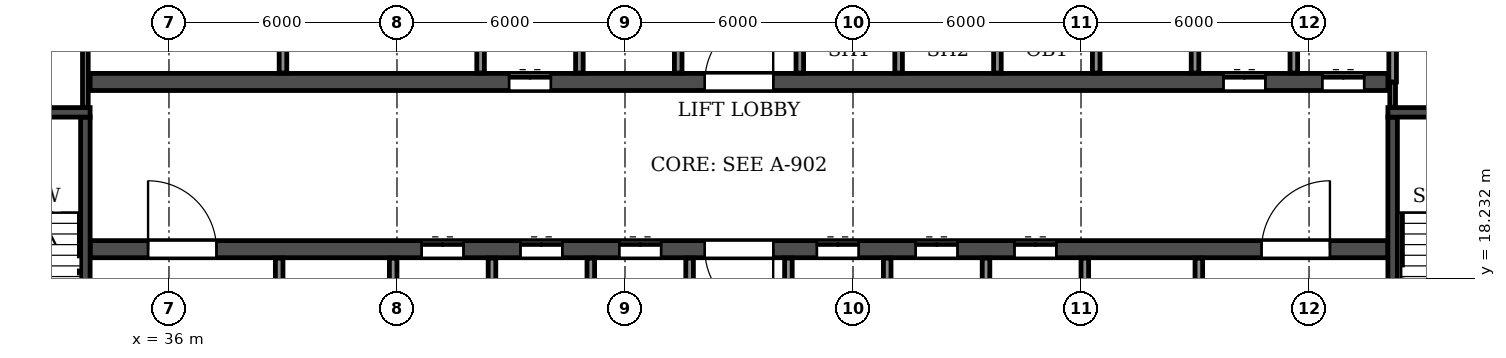
"""IFC4 building model, lengths in metres.
Left out: names, types, materials, properties, quantities, classifications, styles, units other than length and angle.
Written with IfcOpenShell. Run it as: python <this file> out.ifc"""

import sys

from ifc_helpers import new_model, si_unit, direction, frame, frame_2d, origin, place, context, subcontext, project, spatial, rectangle, extrude, element, fill, save


model = new_model("IFC4")
c1 = context("Model", 3, precision=1e-05, world=origin(), true_north=direction((0.0, 1.0)))
c2 = subcontext(c1, "Body", "Model", "MODEL_VIEW")
j1 = project(units=[si_unit("LENGTHUNIT", "METRE"), si_unit("PLANEANGLEUNIT", "RADIAN")], contexts=[c1])
p1 = place(None, origin())
s1 = spatial("IfcSite", under=j1, at=p1, CompositionType="ELEMENT")
p2 = place(p1, origin())
s2 = spatial("IfcBuilding", under=s1, at=p2, CompositionType="ELEMENT")
p3 = place(p2, frame((0.0, 0.0, 6.0)))
s3 = spatial("IfcBuildingStorey", under=s2, at=p3, CompositionType="ELEMENT", Elevation=6.0)
p4 = place(p3, frame((33.925, 19.0, 0.0), z_axis=(0.0, 0.0, 1.0), x_axis=(1.0, 0.0, 0.0)))
e1 = element("IfcWall", 1, at=p4, inside=s3, PredefinedType="SOLIDWALL", context=c2, shape_type="SweptSolid", body=[
    extrude(rectangle(XDim=34.15, YDim=0.45, at=frame_2d((17.075, 0.0))), origin(), (0.0, 0.0, 1.0), 4.52),
])
p5 = place(p4, frame((16.175, 0.0, 0.0)))
e2 = element("IfcOpeningElement", 2, at=p5, cuts=e1, PredefinedType="OPENING", context=c2, shape_type="SweptSolid", body=[
    extrude(rectangle(XDim=1.8, YDim=2.1, at=frame_2d((0.9, 1.05))), frame((0.0, 0.235, 0.0), z_axis=(0.0, -1.0, 0.0), x_axis=(1.0, 0.0, 0.0)), (0.0, 0.0, 1.0), 0.47),
])
p6 = place(p4, frame((1.525, 0.0, 0.0)))
e3 = element("IfcOpeningElement", 3, at=p6, cuts=e1, PredefinedType="OPENING", context=c2, shape_type="SweptSolid", body=[
    extrude(rectangle(XDim=1.8, YDim=2.1, at=frame_2d((0.9, 1.05))), frame((0.0, 0.235, 0.0), z_axis=(0.0, -1.0, 0.0), x_axis=(1.0, 0.0, 0.0)), (0.0, 0.0, 1.0), 0.47),
])
p7 = place(p4, frame((8.725, 0.0, 0.0)))
e4 = element("IfcOpeningElement", 4, at=p7, cuts=e1, PredefinedType="OPENING", context=c2, shape_type="SweptSolid", body=[
    extrude(rectangle(XDim=1.1, YDim=2.1, at=frame_2d((0.55, 1.05))), frame((0.0, 0.235, 0.0), z_axis=(0.0, -1.0, 0.0), x_axis=(1.0, 0.0, 0.0)), (0.0, 0.0, 1.0), 0.47),
])
p8 = place(p4, frame((11.325, 0.0, 0.0)))
e5 = element("IfcOpeningElement", 5, at=p8, cuts=e1, PredefinedType="OPENING", context=c2, shape_type="SweptSolid", body=[
    extrude(rectangle(XDim=1.1, YDim=2.1, at=frame_2d((0.55, 1.05))), frame((0.0, 0.235, 0.0), z_axis=(0.0, -1.0, 0.0), x_axis=(1.0, 0.0, 0.0)), (0.0, 0.0, 1.0), 0.47),
])
p9 = place(p4, frame((13.925, 0.0, 0.0)))
e6 = element("IfcOpeningElement", 6, at=p9, cuts=e1, PredefinedType="OPENING", context=c2, shape_type="SweptSolid", body=[
    extrude(rectangle(XDim=1.1, YDim=2.1, at=frame_2d((0.55, 1.05))), frame((0.0, 0.235, 0.0), z_axis=(0.0, -1.0, 0.0), x_axis=(1.0, 0.0, 0.0)), (0.0, 0.0, 1.0), 0.47),
])
p10 = place(p4, frame((19.125, 0.0, 0.0)))
e7 = element("IfcOpeningElement", 7, at=p10, cuts=e1, PredefinedType="OPENING", context=c2, shape_type="SweptSolid", body=[
    extrude(rectangle(XDim=1.1, YDim=2.1, at=frame_2d((0.55, 1.05))), frame((0.0, 0.235, 0.0), z_axis=(0.0, -1.0, 0.0), x_axis=(1.0, 0.0, 0.0)), (0.0, 0.0, 1.0), 0.47),
])
p11 = place(p4, frame((21.725, 0.0, 0.0)))
e8 = element("IfcOpeningElement", 8, at=p11, cuts=e1, PredefinedType="OPENING", context=c2, shape_type="SweptSolid", body=[
    extrude(rectangle(XDim=1.1, YDim=2.1, at=frame_2d((0.55, 1.05))), frame((0.0, 0.235, 0.0), z_axis=(0.0, -1.0, 0.0), x_axis=(1.0, 0.0, 0.0)), (0.0, 0.0, 1.0), 0.47),
])
p12 = place(p4, frame((24.325, 0.0, 0.0)))
e9 = element("IfcOpeningElement", 9, at=p12, cuts=e1, PredefinedType="OPENING", context=c2, shape_type="SweptSolid", body=[
    extrude(rectangle(XDim=1.1, YDim=2.1, at=frame_2d((0.55, 1.05))), frame((0.0, 0.235, 0.0), z_axis=(0.0, -1.0, 0.0), x_axis=(1.0, 0.0, 0.0)), (0.0, 0.0, 1.0), 0.47),
])
p13 = place(p4, frame((30.825, 0.0, 0.0)))
e10 = element("IfcOpeningElement", 10, at=p13, cuts=e1, PredefinedType="OPENING", context=c2, shape_type="SweptSolid", body=[
    extrude(rectangle(XDim=1.8, YDim=2.1, at=frame_2d((0.9, 1.05))), frame((0.0, 0.235, 0.0), z_axis=(0.0, -1.0, 0.0), x_axis=(1.0, 0.0, 0.0)), (0.0, 0.0, 1.0), 0.47),
])
p14 = place(p3, frame((33.925, 23.4, 0.0), z_axis=(0.0, 0.0, 1.0), x_axis=(1.0, 0.0, 0.0)))
e11 = element("IfcWall", 11, at=p14, inside=s3, PredefinedType="SOLIDWALL", context=c2, shape_type="SweptSolid", body=[
    extrude(rectangle(XDim=34.15, YDim=0.45, at=frame_2d((17.075, 0.0))), origin(), (0.0, 0.0, 1.0), 4.52),
])
p15 = place(p14, frame((16.175, 0.0, 0.0)))
e12 = element("IfcOpeningElement", 12, at=p15, cuts=e11, PredefinedType="OPENING", context=c2, shape_type="SweptSolid", body=[
    extrude(rectangle(XDim=1.8, YDim=2.1, at=frame_2d((0.9, 1.05))), frame((0.0, 0.235, 0.0), z_axis=(0.0, -1.0, 0.0), x_axis=(1.0, 0.0, 0.0)), (0.0, 0.0, 1.0), 0.47),
])
p16 = place(p14, frame((11.025, 0.0, 0.0)))
e13 = element("IfcOpeningElement", 13, at=p16, cuts=e11, PredefinedType="OPENING", context=c2, shape_type="SweptSolid", body=[
    extrude(rectangle(XDim=1.1, YDim=2.1, at=frame_2d((0.55, 1.05))), frame((0.0, 0.235, 0.0), z_axis=(0.0, -1.0, 0.0), x_axis=(1.0, 0.0, 0.0)), (0.0, 0.0, 1.0), 0.47),
])
p17 = place(p14, frame((29.825, 0.0, 0.0)))
e14 = element("IfcOpeningElement", 14, at=p17, cuts=e11, PredefinedType="OPENING", context=c2, shape_type="SweptSolid", body=[
    extrude(rectangle(XDim=1.1, YDim=2.1, at=frame_2d((0.55, 1.05))), frame((0.0, 0.235, 0.0), z_axis=(0.0, -1.0, 0.0), x_axis=(1.0, 0.0, 0.0)), (0.0, 0.0, 1.0), 0.47),
])
p18 = place(p14, frame((32.425, 0.0, 0.0)))
e15 = element("IfcOpeningElement", 15, at=p18, cuts=e11, PredefinedType="OPENING", context=c2, shape_type="SweptSolid", body=[
    extrude(rectangle(XDim=1.1, YDim=2.1, at=frame_2d((0.55, 1.05))), frame((0.0, 0.235, 0.0), z_axis=(0.0, -1.0, 0.0), x_axis=(1.0, 0.0, 0.0)), (0.0, 0.0, 1.0), 0.47),
])
p19 = place(p3, frame((33.8, 14.825, 0.0), z_axis=(0.0, 0.0, 1.0), x_axis=(0.0, 1.0, 0.0)))
e16 = element("IfcWall", 16, at=p19, inside=s3, PredefinedType="SOLIDWALL", context=c2, shape_type="SweptSolid", body=[
    extrude(rectangle(XDim=7.65, YDim=0.25, at=frame_2d((3.825, 0.0))), origin(), (0.0, 0.0, 1.0), 4.52),
])
p20 = place(p19, frame((0.475, 0.0, 0.0)))
e17 = element("IfcOpeningElement", 17, at=p20, cuts=e16, PredefinedType="OPENING", context=c2, shape_type="SweptSolid", body=[
    extrude(rectangle(XDim=1.0, YDim=2.1, at=frame_2d((0.5, 1.05))), frame((0.0, 0.135, 0.0), z_axis=(0.0, -1.0, 0.0), x_axis=(1.0, 0.0, 0.0)), (0.0, 0.0, 1.0), 0.27),
])
p21 = place(p3, frame((29.875, 22.6, 0.0), z_axis=(0.0, 0.0, 1.0), x_axis=(1.0, 0.0, 0.0)))
e18 = element("IfcWall", 18, at=p21, inside=s3, PredefinedType="SOLIDWALL", context=c2, shape_type="SweptSolid", body=[
    extrude(rectangle(XDim=4.05, YDim=0.25, at=frame_2d((2.025, 0.0))), origin(), (0.0, 0.0, 1.0), 4.52),
])
p22 = place(p3, frame((68.2, 14.825, 0.0), z_axis=(0.0, 0.0, 1.0), x_axis=(0.0, 1.0, 0.0)))
e19 = element("IfcWall", 19, at=p22, inside=s3, PredefinedType="SOLIDWALL", context=c2, shape_type="SweptSolid", body=[
    extrude(rectangle(XDim=7.65, YDim=0.25, at=frame_2d((3.825, 0.0))), origin(), (0.0, 0.0, 1.0), 4.52),
])
p23 = place(p22, frame((0.475, 0.0, 0.0)))
e20 = element("IfcOpeningElement", 20, at=p23, cuts=e19, PredefinedType="OPENING", context=c2, shape_type="SweptSolid", body=[
    extrude(rectangle(XDim=1.0, YDim=2.1, at=frame_2d((0.5, 1.05))), frame((0.0, 0.135, 0.0), z_axis=(0.0, -1.0, 0.0), x_axis=(1.0, 0.0, 0.0)), (0.0, 0.0, 1.0), 0.27),
])
p24 = place(p3, frame((68.075, 22.6, 0.0), z_axis=(0.0, 0.0, 1.0), x_axis=(1.0, 0.0, 0.0)))
e21 = element("IfcWall", 21, at=p24, inside=s3, PredefinedType="SOLIDWALL", context=c2, shape_type="SweptSolid", body=[
    extrude(rectangle(XDim=4.05, YDim=0.25, at=frame_2d((2.025, 0.0))), origin(), (0.0, 0.0, 1.0), 4.52),
])
for number, where, z_axis, x_axis in (
    (22, (49.4, 23.635, 0.0), (0.0, 0.0, 1.0), (0.0, 1.0, 0.0)),
    (23, (39.0, 23.635, 0.0), (0.0, 0.0, 1.0), (0.0, 1.0, 0.0)),
):
    element("IfcWall", number, at=place(p3, frame(where, z_axis=z_axis, x_axis=x_axis)), inside=s3, PredefinedType="PARTITIONING", context=c2, shape_type="SweptSolid", body=[
        extrude(rectangle(XDim=3.93, YDim=0.2, at=frame_2d((1.965, 0.0))), origin(), (0.0, 0.0, 1.0), 4.52),
    ])
p25 = place(p3, frame((33.8, 22.735, 0.0), z_axis=(0.0, 0.0, 1.0), x_axis=(0.0, 1.0, 0.0)))
e24 = element("IfcWall", 24, at=p25, inside=s3, PredefinedType="PARTITIONING", context=c2, shape_type="SweptSolid", body=[
    extrude(rectangle(XDim=4.83, YDim=0.15, at=frame_2d((2.415, 0.0))), origin(), (0.0, 0.0, 1.0), 4.52),
])
p26 = place(p3, frame((68.2, 22.735, 0.0), z_axis=(0.0, 0.0, 1.0), x_axis=(0.0, 1.0, 0.0)))
e25 = element("IfcWall", 25, at=p26, inside=s3, PredefinedType="PARTITIONING", context=c2, shape_type="SweptSolid", body=[
    extrude(rectangle(XDim=0.665, YDim=0.15, at=frame_2d((0.333, 0.0))), origin(), (0.0, 0.0, 1.0), 4.52),
])
p27 = place(p3, frame((38.9, 14.835, 0.0), z_axis=(0.0, 0.0, 1.0), x_axis=(0.0, 1.0, 0.0)))
e26 = element("IfcWall", 26, at=p27, inside=s3, PredefinedType="PARTITIONING", context=c2, shape_type="SweptSolid", body=[
    extrude(rectangle(XDim=3.93, YDim=0.2, at=frame_2d((1.965, 0.0))), origin(), (0.0, 0.0, 1.0), 4.52),
])
p28 = place(p27, frame((1.415, 0.0, 0.0)))
e27 = element("IfcOpeningElement", 27, at=p28, cuts=e26, PredefinedType="OPENING", context=c2, shape_type="SweptSolid", body=[
    extrude(rectangle(XDim=1.1, YDim=2.1, at=frame_2d((0.55, 1.05))), frame((0.0, 0.11, 0.0), z_axis=(0.0, -1.0, 0.0), x_axis=(1.0, 0.0, 0.0)), (0.0, 0.0, 1.0), 0.22),
])
for number, where, z_axis, x_axis in (
    (28, (41.9, 14.835, 0.0), (0.0, 0.0, 1.0), (0.0, 1.0, 0.0)),
    (29, (44.2, 23.635, 0.0), (0.0, 0.0, 1.0), (0.0, 1.0, 0.0)),
):
    element("IfcWall", number, at=place(p3, frame(where, z_axis=z_axis, x_axis=x_axis)), inside=s3, PredefinedType="PARTITIONING", context=c2, shape_type="SweptSolid", body=[
        extrude(rectangle(XDim=3.93, YDim=0.2, at=frame_2d((1.965, 0.0))), origin(), (0.0, 0.0, 1.0), 4.52),
    ])
p29 = place(p3, frame((44.5, 16.3, 0.0), z_axis=(0.0, 0.0, 1.0), x_axis=(0.0, 1.0, 0.0)))
e30 = element("IfcWall", 30, at=p29, inside=s3, PredefinedType="PARTITIONING", context=c2, shape_type="SweptSolid", body=[
    extrude(rectangle(XDim=2.465, YDim=0.2, at=frame_2d((1.232, 0.0))), origin(), (0.0, 0.0, 1.0), 4.52),
])
p30 = place(p3, frame((46.8, 23.635, 0.0), z_axis=(0.0, 0.0, 1.0), x_axis=(0.0, 1.0, 0.0)))
e31 = element("IfcWall", 31, at=p30, inside=s3, PredefinedType="PARTITIONING", context=c2, shape_type="SweptSolid", body=[
    extrude(rectangle(XDim=3.93, YDim=0.2, at=frame_2d((1.965, 0.0))), origin(), (0.0, 0.0, 1.0), 4.52),
])
for number, where, z_axis, x_axis in (
    (32, (47.1, 16.3, 0.0), (0.0, 0.0, 1.0), (0.0, 1.0, 0.0)),
    (33, (49.7, 16.3, 0.0), (0.0, 0.0, 1.0), (0.0, 1.0, 0.0)),
    (34, (52.3, 16.3, 0.0), (0.0, 0.0, 1.0), (0.0, 1.0, 0.0)),
):
    element("IfcWall", number, at=place(p3, frame(where, z_axis=z_axis, x_axis=x_axis)), inside=s3, PredefinedType="PARTITIONING", context=c2, shape_type="SweptSolid", body=[
        extrude(rectangle(XDim=2.465, YDim=0.2, at=frame_2d((1.232, 0.0))), origin(), (0.0, 0.0, 1.0), 4.52),
    ])
p31 = place(p3, frame((52.6, 23.635, 0.0), z_axis=(0.0, 0.0, 1.0), x_axis=(0.0, 1.0, 0.0)))
e35 = element("IfcWall", 35, at=p31, inside=s3, PredefinedType="PARTITIONING", context=c2, shape_type="SweptSolid", body=[
    extrude(rectangle(XDim=2.465, YDim=0.2, at=frame_2d((1.232, 0.0))), origin(), (0.0, 0.0, 1.0), 4.52),
])
p32 = place(p3, frame((54.9, 16.3, 0.0), z_axis=(0.0, 0.0, 1.0), x_axis=(0.0, 1.0, 0.0)))
e36 = element("IfcWall", 36, at=p32, inside=s3, PredefinedType="PARTITIONING", context=c2, shape_type="SweptSolid", body=[
    extrude(rectangle(XDim=2.465, YDim=0.2, at=frame_2d((1.232, 0.0))), origin(), (0.0, 0.0, 1.0), 4.52),
])
p33 = place(p3, frame((55.2, 23.635, 0.0), z_axis=(0.0, 0.0, 1.0), x_axis=(0.0, 1.0, 0.0)))
e37 = element("IfcWall", 37, at=p33, inside=s3, PredefinedType="PARTITIONING", context=c2, shape_type="SweptSolid", body=[
    extrude(rectangle(XDim=2.465, YDim=0.2, at=frame_2d((1.232, 0.0))), origin(), (0.0, 0.0, 1.0), 4.52),
])
p34 = place(p3, frame((57.5, 16.3, 0.0), z_axis=(0.0, 0.0, 1.0), x_axis=(0.0, 1.0, 0.0)))
e38 = element("IfcWall", 38, at=p34, inside=s3, PredefinedType="PARTITIONING", context=c2, shape_type="SweptSolid", body=[
    extrude(rectangle(XDim=2.465, YDim=0.2, at=frame_2d((1.232, 0.0))), origin(), (0.0, 0.0, 1.0), 4.52),
])
p35 = place(p3, frame((57.8, 23.635, 0.0), z_axis=(0.0, 0.0, 1.0), x_axis=(0.0, 1.0, 0.0)))
e39 = element("IfcWall", 39, at=p35, inside=s3, PredefinedType="PARTITIONING", context=c2, shape_type="SweptSolid", body=[
    extrude(rectangle(XDim=2.465, YDim=0.2, at=frame_2d((1.232, 0.0))), origin(), (0.0, 0.0, 1.0), 4.52),
])
p36 = place(p3, frame((60.1, 14.835, 0.0), z_axis=(0.0, 0.0, 1.0), x_axis=(0.0, 1.0, 0.0)))
e40 = element("IfcWall", 40, at=p36, inside=s3, PredefinedType="PARTITIONING", context=c2, shape_type="SweptSolid", body=[
    extrude(rectangle(XDim=3.93, YDim=0.2, at=frame_2d((1.965, 0.0))), origin(), (0.0, 0.0, 1.0), 4.52),
])
for number, where, z_axis, x_axis in (
    (41, (60.4, 23.635, 0.0), (0.0, 0.0, 1.0), (0.0, 1.0, 0.0)),
    (42, (63.0, 23.635, 0.0), (0.0, 0.0, 1.0), (0.0, 1.0, 0.0)),
):
    element("IfcWall", number, at=place(p3, frame(where, z_axis=z_axis, x_axis=x_axis)), inside=s3, PredefinedType="PARTITIONING", context=c2, shape_type="SweptSolid", body=[
        extrude(rectangle(XDim=2.465, YDim=0.2, at=frame_2d((1.232, 0.0))), origin(), (0.0, 0.0, 1.0), 4.52),
    ])
p37 = place(p3, frame((63.1, 14.835, 0.0), z_axis=(0.0, 0.0, 1.0), x_axis=(0.0, 1.0, 0.0)))
e43 = element("IfcWall", 43, at=p37, inside=s3, PredefinedType="PARTITIONING", context=c2, shape_type="SweptSolid", body=[
    extrude(rectangle(XDim=3.93, YDim=0.2, at=frame_2d((1.965, 0.0))), origin(), (0.0, 0.0, 1.0), 4.52),
])
p38 = place(p37, frame((1.415, 0.0, 0.0)))
e44 = element("IfcOpeningElement", 44, at=p38, cuts=e43, PredefinedType="OPENING", context=c2, shape_type="SweptSolid", body=[
    extrude(rectangle(XDim=1.1, YDim=2.1, at=frame_2d((0.55, 1.05))), frame((0.0, 0.11, 0.0), z_axis=(0.0, -1.0, 0.0), x_axis=(1.0, 0.0, 0.0)), (0.0, 0.0, 1.0), 0.22),
])
p39 = place(p3, frame((65.6, 23.635, 0.0), z_axis=(0.0, 0.0, 1.0), x_axis=(0.0, 1.0, 0.0)))
e45 = element("IfcWall", 45, at=p39, inside=s3, PredefinedType="PARTITIONING", context=c2, shape_type="SweptSolid", body=[
    extrude(rectangle(XDim=2.465, YDim=0.2, at=frame_2d((1.232, 0.0))), origin(), (0.0, 0.0, 1.0), 4.52),
])
p40 = place(p3, frame((68.2, 23.4, 0.0), z_axis=(0.0, 0.0, 1.0), x_axis=(0.0, 1.0, 0.0)))
e46 = element("IfcWall", 46, at=p40, inside=s3, PredefinedType="PARTITIONING", context=c2, shape_type="SweptSolid", body=[
    extrude(rectangle(XDim=2.7, YDim=0.2, at=frame_2d((1.35, 0.0))), origin(), (0.0, 0.0, 1.0), 4.52),
])
p41 = place(p15, origin())
e47 = element("IfcDoor", 47, at=p41, inside=s3, OperationType="DOUBLE_DOOR_SINGLE_SWING", PredefinedType="DOOR", context=c2, shape_type="SweptSolid", body=[
    extrude(rectangle(XDim=1.8, YDim=2.1, at=frame_2d((0.9, 1.05))), frame((0.0, 0.025, 0.0), z_axis=(0.0, -1.0, 0.0), x_axis=(1.0, 0.0, 0.0)), (0.0, 0.0, 1.0), 0.05),
])
fill(e12, e47)
p42 = place(p5, frame((1.8, 0.0, 0.0), z_axis=(0.0, 0.0, 1.0), x_axis=(-1.0, 0.0, 0.0)))
e48 = element("IfcDoor", 48, at=p42, inside=s3, OperationType="DOUBLE_DOOR_SINGLE_SWING", PredefinedType="DOOR", context=c2, shape_type="SweptSolid", body=[
    extrude(rectangle(XDim=1.8, YDim=2.1, at=frame_2d((0.9, 1.05))), frame((0.0, 0.025, 0.0), z_axis=(0.0, -1.0, 0.0), x_axis=(1.0, 0.0, 0.0)), (0.0, 0.0, 1.0), 0.05),
])
fill(e2, e48)
p43 = place(p6, origin())
e49 = element("IfcDoor", 49, at=p43, inside=s3, OperationType="DOUBLE_DOOR_SINGLE_SWING", PredefinedType="DOOR", context=c2, shape_type="SweptSolid", body=[
    extrude(rectangle(XDim=1.8, YDim=2.1, at=frame_2d((0.9, 1.05))), frame((0.0, 0.025, 0.0), z_axis=(0.0, -1.0, 0.0), x_axis=(1.0, 0.0, 0.0)), (0.0, 0.0, 1.0), 0.05),
])
fill(e3, e49)
p44 = place(p7, origin())
e50 = element("IfcDoor", 50, at=p44, inside=s3, OperationType="DOUBLE_DOOR_SLIDING", PredefinedType="DOOR", context=c2, shape_type="SweptSolid", body=[
    extrude(rectangle(XDim=1.1, YDim=2.1, at=frame_2d((0.55, 1.05))), frame((0.0, 0.025, 0.0), z_axis=(0.0, -1.0, 0.0), x_axis=(1.0, 0.0, 0.0)), (0.0, 0.0, 1.0), 0.05),
])
fill(e4, e50)
p45 = place(p16, origin())
e51 = element("IfcDoor", 51, at=p45, inside=s3, OperationType="DOUBLE_DOOR_SLIDING", PredefinedType="DOOR", context=c2, shape_type="SweptSolid", body=[
    extrude(rectangle(XDim=1.1, YDim=2.1, at=frame_2d((0.55, 1.05))), frame((0.0, 0.025, 0.0), z_axis=(0.0, -1.0, 0.0), x_axis=(1.0, 0.0, 0.0)), (0.0, 0.0, 1.0), 0.05),
])
fill(e13, e51)
p46 = place(p8, origin())
e52 = element("IfcDoor", 52, at=p46, inside=s3, OperationType="DOUBLE_DOOR_SLIDING", PredefinedType="DOOR", context=c2, shape_type="SweptSolid", body=[
    extrude(rectangle(XDim=1.1, YDim=2.1, at=frame_2d((0.55, 1.05))), frame((0.0, 0.025, 0.0), z_axis=(0.0, -1.0, 0.0), x_axis=(1.0, 0.0, 0.0)), (0.0, 0.0, 1.0), 0.05),
])
fill(e5, e52)
p47 = place(p9, origin())
e53 = element("IfcDoor", 53, at=p47, inside=s3, OperationType="DOUBLE_DOOR_SLIDING", PredefinedType="DOOR", context=c2, shape_type="SweptSolid", body=[
    extrude(rectangle(XDim=1.1, YDim=2.1, at=frame_2d((0.55, 1.05))), frame((0.0, 0.025, 0.0), z_axis=(0.0, -1.0, 0.0), x_axis=(1.0, 0.0, 0.0)), (0.0, 0.0, 1.0), 0.05),
])
fill(e6, e53)
p48 = place(p10, origin())
e54 = element("IfcDoor", 54, at=p48, inside=s3, OperationType="DOUBLE_DOOR_SLIDING", PredefinedType="DOOR", context=c2, shape_type="SweptSolid", body=[
    extrude(rectangle(XDim=1.1, YDim=2.1, at=frame_2d((0.55, 1.05))), frame((0.0, 0.025, 0.0), z_axis=(0.0, -1.0, 0.0), x_axis=(1.0, 0.0, 0.0)), (0.0, 0.0, 1.0), 0.05),
])
fill(e7, e54)
p49 = place(p11, origin())
e55 = element("IfcDoor", 55, at=p49, inside=s3, OperationType="DOUBLE_DOOR_SLIDING", PredefinedType="DOOR", context=c2, shape_type="SweptSolid", body=[
    extrude(rectangle(XDim=1.1, YDim=2.1, at=frame_2d((0.55, 1.05))), frame((0.0, 0.025, 0.0), z_axis=(0.0, -1.0, 0.0), x_axis=(1.0, 0.0, 0.0)), (0.0, 0.0, 1.0), 0.05),
])
fill(e8, e55)
p50 = place(p12, origin())
e56 = element("IfcDoor", 56, at=p50, inside=s3, OperationType="DOUBLE_DOOR_SLIDING", PredefinedType="DOOR", context=c2, shape_type="SweptSolid", body=[
    extrude(rectangle(XDim=1.1, YDim=2.1, at=frame_2d((0.55, 1.05))), frame((0.0, 0.025, 0.0), z_axis=(0.0, -1.0, 0.0), x_axis=(1.0, 0.0, 0.0)), (0.0, 0.0, 1.0), 0.05),
])
fill(e9, e56)
p51 = place(p17, origin())
e57 = element("IfcDoor", 57, at=p51, inside=s3, OperationType="DOUBLE_DOOR_SLIDING", PredefinedType="DOOR", context=c2, shape_type="SweptSolid", body=[
    extrude(rectangle(XDim=1.1, YDim=2.1, at=frame_2d((0.55, 1.05))), frame((0.0, 0.025, 0.0), z_axis=(0.0, -1.0, 0.0), x_axis=(1.0, 0.0, 0.0)), (0.0, 0.0, 1.0), 0.05),
])
fill(e14, e57)
p52 = place(p13, origin())
e58 = element("IfcDoor", 58, at=p52, inside=s3, OperationType="DOUBLE_DOOR_SINGLE_SWING", PredefinedType="DOOR", context=c2, shape_type="SweptSolid", body=[
    extrude(rectangle(XDim=1.8, YDim=2.1, at=frame_2d((0.9, 1.05))), frame((0.0, 0.025, 0.0), z_axis=(0.0, -1.0, 0.0), x_axis=(1.0, 0.0, 0.0)), (0.0, 0.0, 1.0), 0.05),
])
fill(e10, e58)
p53 = place(p18, origin())
e59 = element("IfcDoor", 59, at=p53, inside=s3, OperationType="DOUBLE_DOOR_SLIDING", PredefinedType="DOOR", context=c2, shape_type="SweptSolid", body=[
    extrude(rectangle(XDim=1.1, YDim=2.1, at=frame_2d((0.55, 1.05))), frame((0.0, 0.025, 0.0), z_axis=(0.0, -1.0, 0.0), x_axis=(1.0, 0.0, 0.0)), (0.0, 0.0, 1.0), 0.05),
])
fill(e15, e59)
save(model, sys.argv[1])
